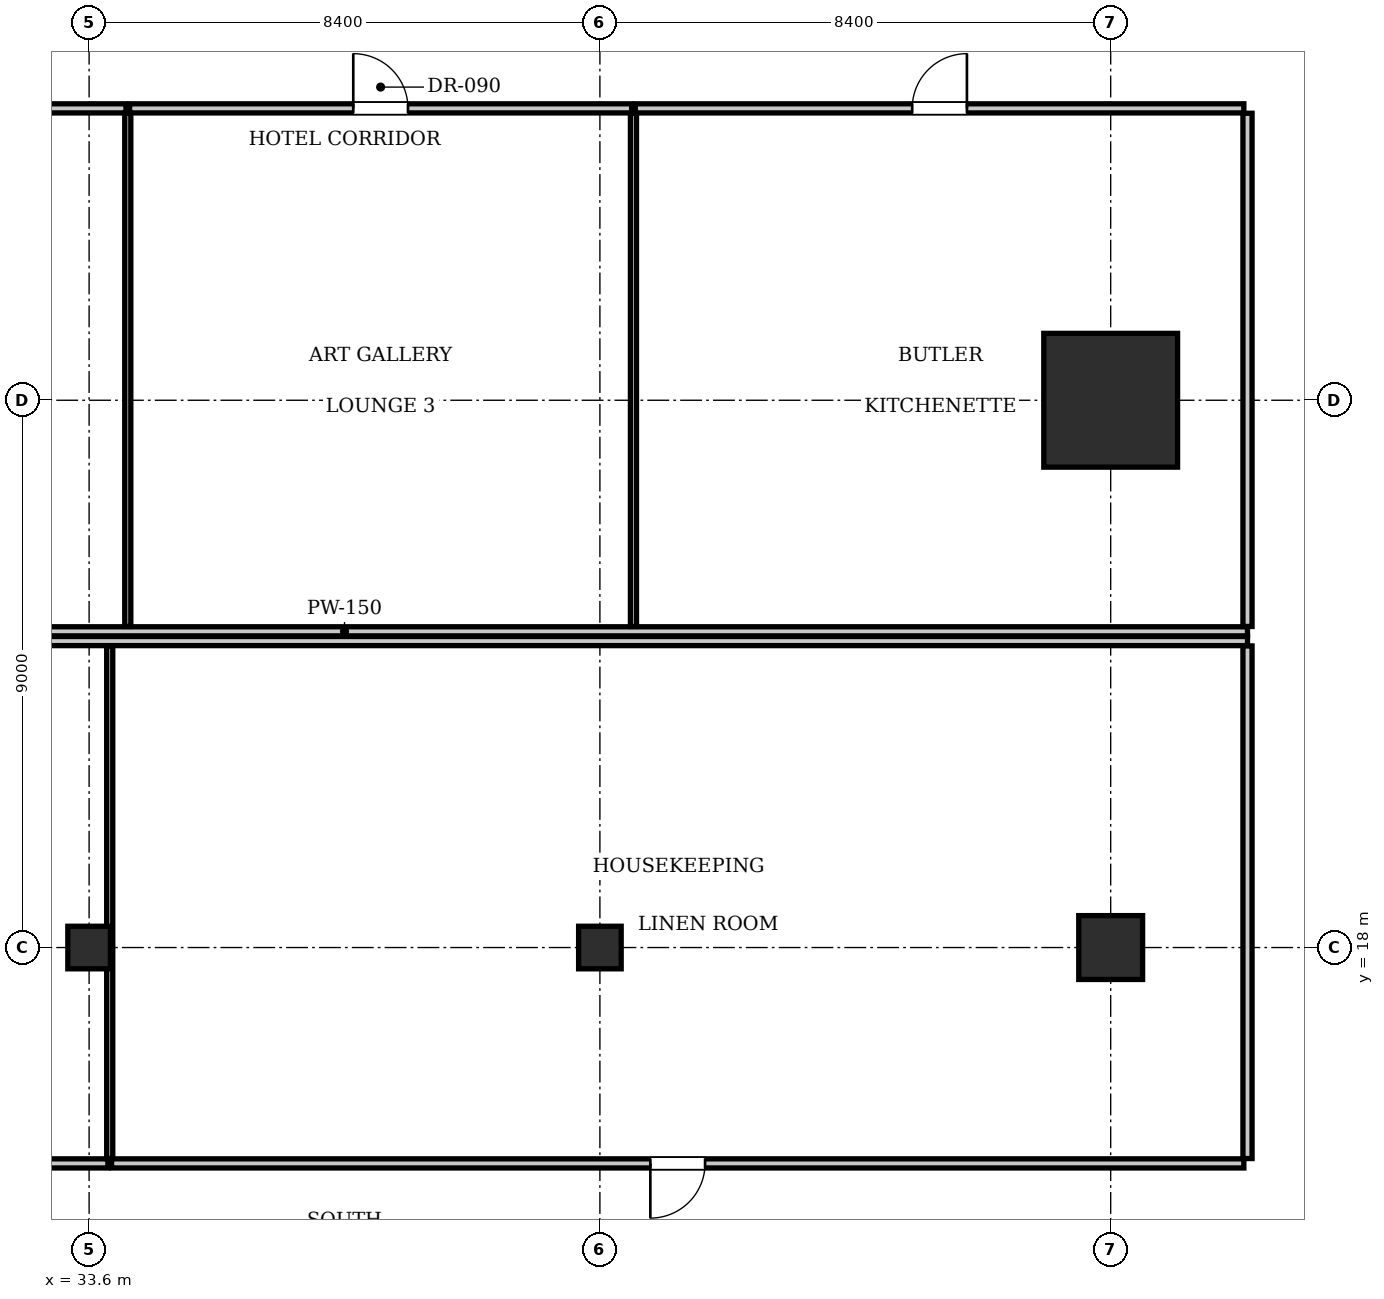
"""IFC4 building model, lengths in metres.
Left out: names, types, materials, properties, quantities, classifications, styles, units other than length and angle.
Written with IfcOpenShell. Run it as: python <this file> out.ifc"""

import sys

from ifc_helpers import new_model, si_unit, direction, frame, frame_2d, origin, origin_2d, place, context, subcontext, project, spatial, rectangle, i_section, extrude, element, fill, save


model = new_model("IFC4")
c1 = context("Model", 3, precision=1e-05, world=origin(), true_north=direction((0.0, 1.0)))
c2 = subcontext(c1, "Body", "Model", "MODEL_VIEW")
j1 = project(units=[si_unit("LENGTHUNIT", "METRE"), si_unit("PLANEANGLEUNIT", "RADIAN")], contexts=[c1])
p1 = place(None, origin())
s1 = spatial("IfcSite", under=j1, at=p1, CompositionType="ELEMENT")
p2 = place(p1, origin())
s2 = spatial("IfcBuilding", under=s1, at=p2, CompositionType="ELEMENT")
p3 = place(p2, frame((0.0, 0.0, 96.25)))
s3 = spatial("IfcBuildingStorey", under=s2, at=p3, CompositionType="ELEMENT", Elevation=96.25)
p4 = place(p3, frame((50.4, 27.0, 0.0), z_axis=(0.0, 0.0, 1.0), x_axis=(1.0, 0.0, 0.0)))
e1 = element("IfcColumn", 1, at=p4, inside=s3, PredefinedType="COLUMN", context=c2, shape_type="SweptSolid", body=[
    extrude(rectangle(XDim=2.2, YDim=2.2, at=origin_2d()), origin(), (0.0, 0.0, 1.0), 3.85),
])
p5 = place(p3, frame((50.4, 18.0, 0.0), z_axis=(0.0, 0.0, 1.0), x_axis=(1.0, 0.0, 0.0)))
e2 = element("IfcColumn", 2, at=p5, inside=s3, PredefinedType="COLUMN", context=c2, shape_type="SweptSolid", body=[
    extrude(rectangle(XDim=1.05, YDim=1.05, at=origin_2d()), origin(), (0.0, 0.0, 1.0), 3.85),
])
for number, where, z_axis, x_axis in (
    (3, (33.6, 18.0, 0.0), (0.0, 0.0, 1.0), (1.0, 0.0, 0.0)),
    (4, (42.0, 18.0, 0.0), (0.0, 0.0, 1.0), (1.0, 0.0, 0.0)),
):
    element("IfcColumn", number, at=place(p3, frame(where, z_axis=z_axis, x_axis=x_axis)), inside=s3, PredefinedType="COLUMN", context=c2, shape_type="SweptSolid", body=[
        extrude(i_section(OverallWidth=0.7, OverallDepth=0.7, WebThickness=0.028, FlangeThickness=0.044, at=origin_2d()), origin(), (0.0, 0.0, 1.0), 3.85),
    ])
p6 = place(p3, frame((22.95, 23.2, 0.0), z_axis=(0.0, 0.0, 1.0), x_axis=(1.0, 0.0, 0.0)))
e5 = element("IfcWall", 5, at=p6, inside=s3, PredefinedType="PARTITIONING", context=c2, shape_type="SweptSolid", body=[
    extrude(rectangle(XDim=29.7, YDim=0.15, at=frame_2d((14.85, 0.0))), origin(), (0.0, 0.0, 1.0), 3.61),
])
p7 = place(p3, frame((52.65, 23.28, 0.0), z_axis=(0.0, 0.0, 1.0), x_axis=(0.0, 1.0, 0.0)))
e6 = element("IfcWall", 6, at=p7, inside=s3, PredefinedType="PARTITIONING", context=c2, shape_type="SweptSolid", body=[
    extrude(rectangle(XDim=8.44, YDim=0.15, at=frame_2d((4.22, 0.0))), origin(), (0.0, 0.0, 1.0), 3.61),
])
p8 = place(p3, frame((27.732, 31.8, 0.0), z_axis=(0.0, 0.0, 1.0), x_axis=(1.0, 0.0, 0.0)))
e7 = element("IfcWall", 7, at=p8, inside=s3, PredefinedType="PARTITIONING", context=c2, shape_type="SweptSolid", body=[
    extrude(rectangle(XDim=6.474, YDim=0.15, at=frame_2d((3.237, 0.0))), origin(), (0.0, 0.0, 1.0), 3.61),
])
p9 = place(p8, frame((2.787, 0.0, 0.0)))
e8 = element("IfcOpeningElement", 8, at=p9, cuts=e7, PredefinedType="OPENING", context=c2, shape_type="SweptSolid", body=[
    extrude(rectangle(XDim=0.9, YDim=2.1, at=frame_2d((0.45, 1.05))), frame((0.0, 0.085, 0.0), z_axis=(0.0, -1.0, 0.0), x_axis=(1.0, 0.0, 0.0)), (0.0, 0.0, 1.0), 0.17),
])
p10 = place(p3, frame((34.236, 23.28, 0.0), z_axis=(0.0, 0.0, 1.0), x_axis=(0.0, 1.0, 0.0)))
e9 = element("IfcWall", 9, at=p10, inside=s3, PredefinedType="PARTITIONING", context=c2, shape_type="SweptSolid", body=[
    extrude(rectangle(XDim=8.44, YDim=0.1, at=frame_2d((4.22, 0.0))), origin(), (0.0, 0.0, 1.0), 3.61),
])
p11 = place(p3, frame((34.266, 31.8, 0.0), z_axis=(0.0, 0.0, 1.0), x_axis=(1.0, 0.0, 0.0)))
e10 = element("IfcWall", 10, at=p11, inside=s3, PredefinedType="PARTITIONING", context=c2, shape_type="SweptSolid", body=[
    extrude(rectangle(XDim=8.256, YDim=0.15, at=frame_2d((4.128, 0.0))), origin(), (0.0, 0.0, 1.0), 3.61),
])
p12 = place(p11, frame((3.678, 0.0, 0.0)))
e11 = element("IfcOpeningElement", 11, at=p12, cuts=e10, PredefinedType="OPENING", context=c2, shape_type="SweptSolid", body=[
    extrude(rectangle(XDim=0.9, YDim=2.1, at=frame_2d((0.45, 1.05))), frame((0.0, 0.085, 0.0), z_axis=(0.0, -1.0, 0.0), x_axis=(1.0, 0.0, 0.0)), (0.0, 0.0, 1.0), 0.17),
])
p13 = place(p3, frame((42.552, 23.28, 0.0), z_axis=(0.0, 0.0, 1.0), x_axis=(0.0, 1.0, 0.0)))
e12 = element("IfcWall", 12, at=p13, inside=s3, PredefinedType="PARTITIONING", context=c2, shape_type="SweptSolid", body=[
    extrude(rectangle(XDim=8.44, YDim=0.1, at=frame_2d((4.22, 0.0))), origin(), (0.0, 0.0, 1.0), 3.61),
])
p14 = place(p3, frame((42.582, 31.8, 0.0), z_axis=(0.0, 0.0, 1.0), x_axis=(1.0, 0.0, 0.0)))
e13 = element("IfcWall", 13, at=p14, inside=s3, PredefinedType="PARTITIONING", context=c2, shape_type="SweptSolid", body=[
    extrude(rectangle(XDim=10.008, YDim=0.15, at=frame_2d((5.004, 0.0))), origin(), (0.0, 0.0, 1.0), 3.61),
])
p15 = place(p14, frame((4.554, 0.0, 0.0)))
e14 = element("IfcOpeningElement", 14, at=p15, cuts=e13, PredefinedType="OPENING", context=c2, shape_type="SweptSolid", body=[
    extrude(rectangle(XDim=0.9, YDim=2.1, at=frame_2d((0.45, 1.05))), frame((0.0, 0.085, 0.0), z_axis=(0.0, -1.0, 0.0), x_axis=(1.0, 0.0, 0.0)), (0.0, 0.0, 1.0), 0.17),
])
p16 = place(p3, frame((22.95, 23.04, 0.0), z_axis=(0.0, 0.0, 1.0), x_axis=(1.0, 0.0, 0.0)))
e15 = element("IfcWall", 15, at=p16, inside=s3, PredefinedType="PARTITIONING", context=c2, shape_type="SweptSolid", body=[
    extrude(rectangle(XDim=29.7, YDim=0.15, at=frame_2d((14.85, 0.0))), origin(), (0.0, 0.0, 1.0), 3.61),
])
p17 = place(p3, frame((52.65, 14.53, 0.0), z_axis=(0.0, 0.0, 1.0), x_axis=(0.0, 1.0, 0.0)))
e16 = element("IfcWall", 16, at=p17, inside=s3, PredefinedType="PARTITIONING", context=c2, shape_type="SweptSolid", body=[
    extrude(rectangle(XDim=8.43, YDim=0.15, at=frame_2d((4.215, 0.0))), origin(), (0.0, 0.0, 1.0), 3.61),
])
p18 = place(p3, frame((23.01, 14.45, 0.0), z_axis=(0.0, 0.0, 1.0), x_axis=(1.0, 0.0, 0.0)))
e17 = element("IfcWall", 17, at=p18, inside=s3, PredefinedType="PARTITIONING", context=c2, shape_type="SweptSolid", body=[
    extrude(rectangle(XDim=10.899, YDim=0.15, at=frame_2d((5.449, 0.0))), origin(), (0.0, 0.0, 1.0), 3.61),
])
p19 = place(p18, frame((5.0, 0.0, 0.0)))
e18 = element("IfcOpeningElement", 18, at=p19, cuts=e17, PredefinedType="OPENING", context=c2, shape_type="SweptSolid", body=[
    extrude(rectangle(XDim=0.9, YDim=2.1, at=frame_2d((0.45, 1.05))), frame((0.0, 0.085, 0.0), z_axis=(0.0, -1.0, 0.0), x_axis=(1.0, 0.0, 0.0)), (0.0, 0.0, 1.0), 0.17),
])
p20 = place(p3, frame((33.939, 14.53, 0.0), z_axis=(0.0, 0.0, 1.0), x_axis=(0.0, 1.0, 0.0)))
e19 = element("IfcWall", 19, at=p20, inside=s3, PredefinedType="PARTITIONING", context=c2, shape_type="SweptSolid", body=[
    extrude(rectangle(XDim=8.43, YDim=0.1, at=frame_2d((4.215, 0.0))), origin(), (0.0, 0.0, 1.0), 3.61),
])
p21 = place(p3, frame((33.969, 14.45, 0.0), z_axis=(0.0, 0.0, 1.0), x_axis=(1.0, 0.0, 0.0)))
e20 = element("IfcWall", 20, at=p21, inside=s3, PredefinedType="PARTITIONING", context=c2, shape_type="SweptSolid", body=[
    extrude(rectangle(XDim=18.621, YDim=0.15, at=frame_2d((9.311, 0.0))), origin(), (0.0, 0.0, 1.0), 3.61),
])
p22 = place(p21, frame((8.861, 0.0, 0.0)))
e21 = element("IfcOpeningElement", 21, at=p22, cuts=e20, PredefinedType="OPENING", context=c2, shape_type="SweptSolid", body=[
    extrude(rectangle(XDim=0.9, YDim=2.1, at=frame_2d((0.45, 1.05))), frame((0.0, 0.085, 0.0), z_axis=(0.0, -1.0, 0.0), x_axis=(1.0, 0.0, 0.0)), (0.0, 0.0, 1.0), 0.17),
])
p23 = place(p12, origin())
e22 = element("IfcDoor", 22, at=p23, inside=s3, OperationType="SINGLE_SWING_LEFT", PredefinedType="DOOR", context=c2, shape_type="SweptSolid", body=[
    extrude(rectangle(XDim=0.9, YDim=2.1, at=frame_2d((0.45, 1.05))), frame((0.0, 0.025, 0.0), z_axis=(0.0, -1.0, 0.0), x_axis=(1.0, 0.0, 0.0)), (0.0, 0.0, 1.0), 0.05),
])
fill(e11, e22)
p24 = place(p15, origin())
e23 = element("IfcDoor", 23, at=p24, inside=s3, OperationType="SINGLE_SWING_RIGHT", PredefinedType="DOOR", context=c2, shape_type="SweptSolid", body=[
    extrude(rectangle(XDim=0.9, YDim=2.1, at=frame_2d((0.45, 1.05))), frame((0.0, 0.025, 0.0), z_axis=(0.0, -1.0, 0.0), x_axis=(1.0, 0.0, 0.0)), (0.0, 0.0, 1.0), 0.05),
])
fill(e14, e23)
p25 = place(p22, frame((0.9, 0.0, 0.0), z_axis=(0.0, 0.0, 1.0), x_axis=(-1.0, 0.0, 0.0)))
e24 = element("IfcDoor", 24, at=p25, inside=s3, OperationType="SINGLE_SWING_RIGHT", PredefinedType="DOOR", context=c2, shape_type="SweptSolid", body=[
    extrude(rectangle(XDim=0.9, YDim=2.1, at=frame_2d((0.45, 1.05))), frame((0.0, 0.025, 0.0), z_axis=(0.0, -1.0, 0.0), x_axis=(1.0, 0.0, 0.0)), (0.0, 0.0, 1.0), 0.05),
])
fill(e21, e24)
save(model, sys.argv[1])
